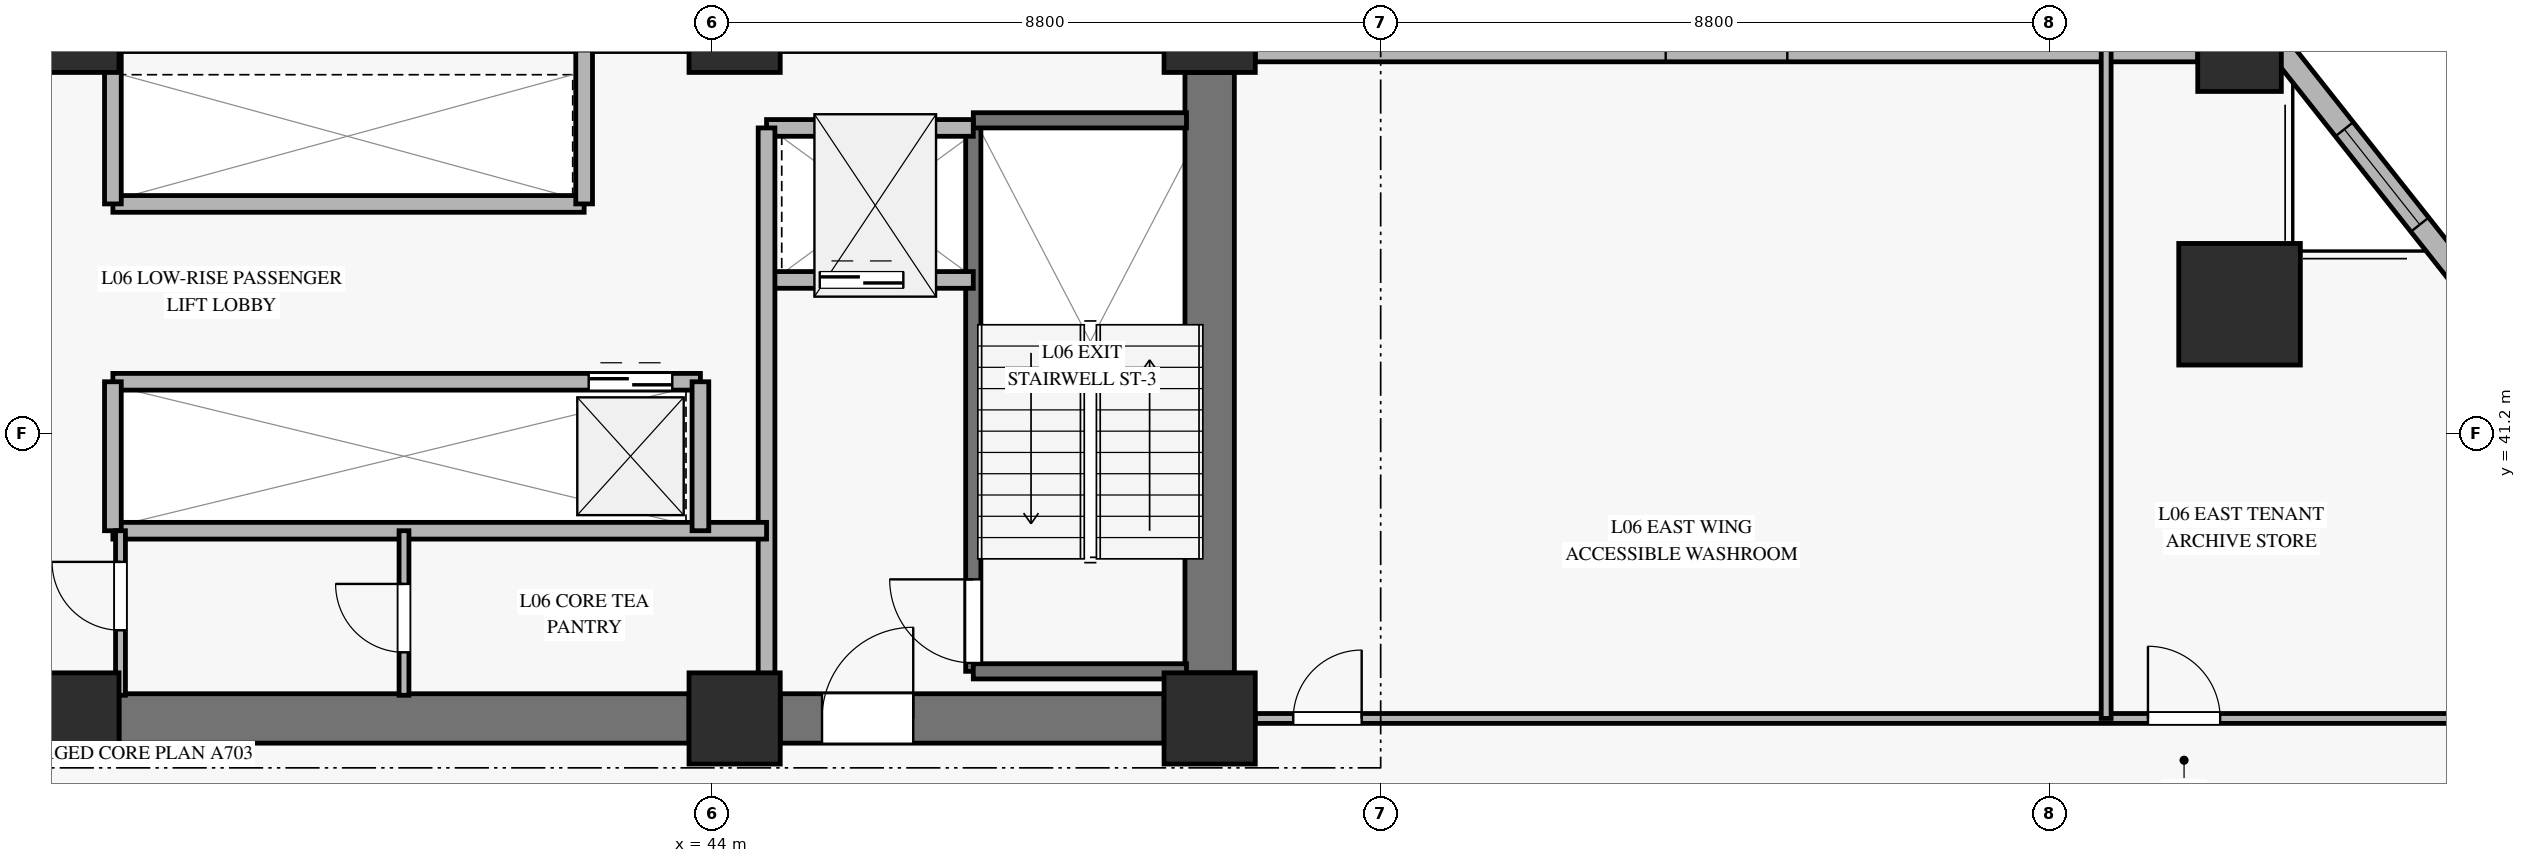
"""IFC4 building model, lengths in metres.
Left out: names, types, materials, properties, quantities, classifications, styles, units other than length and angle.
Written with IfcOpenShell. Run it as: python <this file> out.ifc"""

import sys

from ifc_helpers import new_model, si_unit, direction, frame, frame_2d, origin, origin_2d, place, context, subcontext, project, spatial, rectangle, hollow_rectangle, extrude, source, transform, mapped, element, fill, save


model = new_model("IFC4")
c1 = context("Model", 3, precision=1e-05, world=origin(), true_north=direction((0.0, 1.0)))
c2 = subcontext(c1, "Body", "Model", "MODEL_VIEW")
j1 = project(units=[si_unit("LENGTHUNIT", "METRE"), si_unit("PLANEANGLEUNIT", "RADIAN")], contexts=[c1])
p1 = place(None, origin())
s1 = spatial("IfcSite", under=j1, at=p1, CompositionType="ELEMENT")
p2 = place(p1, origin())
s2 = spatial("IfcBuilding", under=s1, at=p2, CompositionType="ELEMENT")
p3 = place(p2, frame((0.0, 0.0, 25.4)))
s3 = spatial("IfcBuildingStorey", under=s2, at=p3, CompositionType="ELEMENT", Elevation=25.4)
m1 = source(origin(), c2, "Body", "SweptSolid", [
    extrude(rectangle(XDim=1.2, YDim=1.2, at=origin_2d()), origin(), (0.0, 0.0, 1.0), 3.68),
])
for number, where, z_axis, x_axis in (
    (1, (35.6, 37.45, 0.0), (0.0, 0.0, 1.0), (1.0, 0.0, 0.0)),
    (2, (35.6, 46.55, 0.0), (0.0, 0.0, 1.0), (1.0, 0.0, 0.0)),
    (3, (44.3, 37.45, 0.0), (0.0, 0.0, 1.0), (1.0, 0.0, 0.0)),
    (4, (44.3, 46.55, 0.0), (0.0, 0.0, 1.0), (1.0, 0.0, 0.0)),
    (5, (50.55, 37.45, 0.0), (0.0, 0.0, 1.0), (1.0, 0.0, 0.0)),
    (6, (50.55, 46.55, 0.0), (0.0, 0.0, 1.0), (1.0, 0.0, 0.0)),
):
    element("IfcColumn", number, at=place(p3, frame(where, z_axis=z_axis, x_axis=x_axis)), inside=s3, PredefinedType="PILASTER", context=c2, shape_type="MappedRepresentation", body=[
        mapped(m1, transform((0.0, 0.0, 0.0), x_axis=(1.0, 0.0, 0.0), y_axis=(0.0, 1.0, 0.0), z_axis=(0.0, 0.0, 1.0), scale=1.0)),
    ])
p4 = place(p3, frame((36.2, 37.45, 0.0), z_axis=(0.0, 0.0, 1.0), x_axis=(1.0, 0.0, 0.0)))
e7 = element("IfcWall", 7, at=p4, inside=s3, PredefinedType="SHEAR", context=c2, shape_type="SweptSolid", body=[
    extrude(rectangle(XDim=7.5, YDim=0.65, at=frame_2d((3.75, 0.0))), origin(), (0.0, 0.0, 1.0), 3.68),
])
p5 = place(p3, frame((44.9, 37.45, 0.0), z_axis=(0.0, 0.0, 1.0), x_axis=(1.0, 0.0, 0.0)))
e8 = element("IfcWall", 8, at=p5, inside=s3, PredefinedType="SHEAR", context=c2, shape_type="SweptSolid", body=[
    extrude(rectangle(XDim=5.05, YDim=0.65, at=frame_2d((2.525, 0.0))), origin(), (0.0, 0.0, 1.0), 3.68),
])
p6 = place(p5, frame((0.55, 0.0, 0.0)))
e9 = element("IfcOpeningElement", 9, at=p6, cuts=e8, PredefinedType="OPENING", context=c2, shape_type="SweptSolid", body=[
    extrude(rectangle(XDim=1.2, YDim=2.15, at=frame_2d((0.6, 1.075))), frame((0.0, 0.335, 0.0), z_axis=(0.0, -1.0, 0.0), x_axis=(1.0, 0.0, 0.0)), (0.0, 0.0, 1.0), 0.67),
])
p7 = place(p3, frame((50.55, 38.05, 0.0), z_axis=(0.0, 0.0, 1.0), x_axis=(0.0, 1.0, 0.0)))
e10 = element("IfcWall", 10, at=p7, inside=s3, PredefinedType="SHEAR", context=c2, shape_type="SweptSolid", body=[
    extrude(rectangle(XDim=7.9, YDim=0.65, at=frame_2d((3.95, 0.0))), origin(), (0.0, 0.0, 1.0), 3.68),
])
m2 = source(origin(), c2, "Body", "SweptSolid", [
    extrude(hollow_rectangle(XDim=1.6, YDim=1.6, WallThickness=0.075, at=origin_2d()), origin(), (0.0, 0.0, 1.0), 3.68),
])
p8 = place(p3, frame((64.1, 42.9, 0.0), z_axis=(0.0, 0.0, 1.0), x_axis=(1.0, 0.0, 0.0)))
e11 = element("IfcColumn", 11, at=p8, inside=s3, PredefinedType="COLUMN", context=c2, shape_type="MappedRepresentation", body=[
    mapped(m2, transform((0.0, 0.0, 0.0), x_axis=(1.0, 0.0, 0.0), y_axis=(0.0, 1.0, 0.0), z_axis=(0.0, 0.0, 1.0), scale=1.0)),
])
m3 = source(origin(), c2, "Body", "SweptSolid", [
    extrude(hollow_rectangle(XDim=1.1, YDim=1.1, WallThickness=0.05, at=origin_2d()), origin(), (0.0, 0.0, 1.0), 3.68),
])
p9 = place(p3, frame((64.1, 46.25, 0.0), z_axis=(0.0, 0.0, 1.0), x_axis=(1.0, 0.0, 0.0)))
e12 = element("IfcColumn", 12, at=p9, inside=s3, PredefinedType="COLUMN", context=c2, shape_type="MappedRepresentation", body=[
    mapped(m3, transform((0.0, 0.0, 0.0), x_axis=(1.0, 0.0, 0.0), y_axis=(0.0, 1.0, 0.0), z_axis=(0.0, 0.0, 1.0), scale=1.0)),
])
p10 = place(p3, frame((51.15, 46.25, 0.0), z_axis=(0.0, 0.0, 1.0), x_axis=(1.0, 0.0, 0.0)))
e13 = element("IfcWall", 13, at=p10, inside=s3, PredefinedType="SOLIDWALL", context=c2, shape_type="SweptSolid", body=[
    extrude(rectangle(XDim=12.4, YDim=0.32, at=frame_2d((6.2, 0.0))), origin(), (0.0, 0.0, 1.0), 3.16),
])
p11 = place(p10, frame((5.4, 0.0, 0.45)))
e14 = element("IfcOpeningElement", 14, at=p11, cuts=e13, PredefinedType="OPENING", context=c2, shape_type="SweptSolid", body=[
    extrude(rectangle(XDim=1.6, YDim=2.0, at=frame_2d((0.8, 1.0))), frame((0.0, 0.17, 0.0), z_axis=(0.0, -1.0, 0.0), x_axis=(1.0, 0.0, 0.0)), (0.0, 0.0, 1.0), 0.34),
])
p12 = place(p3, frame((67.3, 42.9, 0.0), z_axis=(0.0, 0.0, 1.0), x_axis=(-0.620413042185, 0.784275243194, 0.0)))
e15 = element("IfcWall", 15, at=p12, inside=s3, PredefinedType="SOLIDWALL", context=c2, shape_type="SweptSolid", body=[
    extrude(rectangle(XDim=4.271, YDim=0.3, at=frame_2d((2.136, 0.0))), origin(), (0.0, 0.0, 1.0), 3.16),
])
p13 = place(p12, frame((1.336, 0.0, 0.45)))
e16 = element("IfcOpeningElement", 16, at=p13, cuts=e15, PredefinedType="OPENING", context=c2, shape_type="SweptSolid", body=[
    extrude(rectangle(XDim=1.6, YDim=2.0, at=frame_2d((0.8, 1.0))), frame((0.0, 0.16, 0.0), z_axis=(0.0, -1.0, 0.0), x_axis=(1.0, 0.0, 0.0)), (0.0, 0.0, 1.0), 0.32),
])
p14 = place(p3, frame((47.44, 38.07, 0.0), z_axis=(0.0, 0.0, 1.0), x_axis=(0.0, 1.0, 0.0)))
e17 = element("IfcWall", 17, at=p14, inside=s3, PredefinedType="SOLIDWALL", context=c2, shape_type="SweptSolid", body=[
    extrude(rectangle(XDim=7.25, YDim=0.2, at=frame_2d((3.625, 0.0))), origin(), (0.0, 0.0, 1.0), 3.9),
])
p15 = place(p14, frame((0.11, 0.0, 0.0)))
e18 = element("IfcOpeningElement", 18, at=p15, cuts=e17, PredefinedType="OPENING", context=c2, shape_type="SweptSolid", body=[
    extrude(rectangle(XDim=1.1, YDim=2.15, at=frame_2d((0.55, 1.075))), frame((0.0, 0.11, 0.0), z_axis=(0.0, -1.0, 0.0), x_axis=(1.0, 0.0, 0.0)), (0.0, 0.0, 1.0), 0.22),
])
for number, where, z_axis, x_axis in (
    (19, (47.44, 45.32, 0.0), (0.0, 0.0, 1.0), (1.0, 0.0, 0.0)),
    (20, (47.44, 38.07, 0.0), (0.0, 0.0, 1.0), (1.0, 0.0, 0.0)),
):
    element("IfcWall", number, at=place(p3, frame(where, z_axis=z_axis, x_axis=x_axis)), inside=s3, PredefinedType="SOLIDWALL", context=c2, shape_type="SweptSolid", body=[
        extrude(rectangle(XDim=2.805, YDim=0.2, at=frame_2d((1.403, 0.0))), origin(), (0.0, 0.0, 1.0), 3.9),
    ])
p16 = place(p3, frame((44.72, 43.22, 0.0), z_axis=(0.0, 0.0, 1.0), x_axis=(1.0, 0.0, 0.0)))
e21 = element("IfcWall", 21, at=p16, inside=s3, PredefinedType="SOLIDWALL", context=c2, shape_type="SweptSolid", body=[
    extrude(rectangle(XDim=2.72, YDim=0.22, at=frame_2d((1.36, 0.0))), origin(), (0.0, 0.0, 1.0), 3.68),
])
p17 = place(p16, frame((0.7, 0.0, 0.0)))
e22 = element("IfcOpeningElement", 22, at=p17, cuts=e21, PredefinedType="OPENING", context=c2, shape_type="SweptSolid", body=[
    extrude(rectangle(XDim=1.1, YDim=2.2, at=frame_2d((0.55, 1.1))), frame((0.0, 0.12, 0.0), z_axis=(0.0, -1.0, 0.0), x_axis=(1.0, 0.0, 0.0)), (0.0, 0.0, 1.0), 0.24),
])
p18 = place(p3, frame((44.72, 45.22, 0.0), z_axis=(0.0, 0.0, 1.0), x_axis=(1.0, 0.0, 0.0)))
e23 = element("IfcWall", 23, at=p18, inside=s3, PredefinedType="SOLIDWALL", context=c2, shape_type="SweptSolid", body=[
    extrude(rectangle(XDim=2.72, YDim=0.22, at=frame_2d((1.36, 0.0))), origin(), (0.0, 0.0, 1.0), 3.68),
])
p19 = place(p3, frame((44.72, 37.755, 0.0), z_axis=(0.0, 0.0, 1.0), x_axis=(0.0, 1.0, 0.0)))
e24 = element("IfcWall", 24, at=p19, inside=s3, PredefinedType="SOLIDWALL", context=c2, shape_type="SweptSolid", body=[
    extrude(rectangle(XDim=7.465, YDim=0.22, at=frame_2d((3.732, 0.0))), origin(), (0.0, 0.0, 1.0), 3.68),
])
p20 = place(p3, frame((36.12, 44.22, 0.0), z_axis=(0.0, 0.0, 1.0), x_axis=(1.0, 0.0, 0.0)))
e25 = element("IfcWall", 25, at=p20, inside=s3, PredefinedType="SOLIDWALL", context=c2, shape_type="SweptSolid", body=[
    extrude(rectangle(XDim=6.2, YDim=0.22, at=frame_2d((3.1, 0.0))), origin(), (0.0, 0.0, 1.0), 3.68),
])
for number, where, z_axis, x_axis in (
    (26, (36.12, 44.22, 0.0), (0.0, 0.0, 1.0), (0.0, 1.0, 0.0)),
    (27, (42.32, 44.22, 0.0), (0.0, 0.0, 1.0), (0.0, 1.0, 0.0)),
):
    element("IfcWall", number, at=place(p3, frame(where, z_axis=z_axis, x_axis=x_axis)), inside=s3, PredefinedType="SOLIDWALL", context=c2, shape_type="SweptSolid", body=[
        extrude(rectangle(XDim=2.025, YDim=0.22, at=frame_2d((1.013, 0.0))), origin(), (0.0, 0.0, 1.0), 3.68),
    ])
p21 = place(p3, frame((36.12, 41.88, 0.0), z_axis=(0.0, 0.0, 1.0), x_axis=(1.0, 0.0, 0.0)))
e28 = element("IfcWall", 28, at=p21, inside=s3, PredefinedType="SOLIDWALL", context=c2, shape_type="SweptSolid", body=[
    extrude(rectangle(XDim=7.73, YDim=0.22, at=frame_2d((3.865, 0.0))), origin(), (0.0, 0.0, 1.0), 3.68),
])
p22 = place(p21, frame((6.26, 0.0, 0.0)))
e29 = element("IfcOpeningElement", 29, at=p22, cuts=e28, PredefinedType="OPENING", context=c2, shape_type="SweptSolid", body=[
    extrude(rectangle(XDim=1.1, YDim=2.2, at=frame_2d((0.55, 1.1))), frame((0.0, 0.12, 0.0), z_axis=(0.0, -1.0, 0.0), x_axis=(1.0, 0.0, 0.0)), (0.0, 0.0, 1.0), 0.24),
])
p23 = place(p3, frame((36.12, 39.92, 0.0), z_axis=(0.0, 0.0, 1.0), x_axis=(1.0, 0.0, 0.0)))
e30 = element("IfcWall", 30, at=p23, inside=s3, PredefinedType="SOLIDWALL", context=c2, shape_type="SweptSolid", body=[
    extrude(rectangle(XDim=8.6, YDim=0.22, at=frame_2d((4.3, 0.0))), origin(), (0.0, 0.0, 1.0), 2.965),
])
for number, where, z_axis, x_axis in (
    (31, (36.12, 39.92, 0.0), (0.0, 0.0, 1.0), (0.0, 1.0, 0.0)),
    (32, (43.85, 39.92, 0.0), (0.0, 0.0, 1.0), (0.0, 1.0, 0.0)),
):
    element("IfcWall", number, at=place(p3, frame(where, z_axis=z_axis, x_axis=x_axis)), inside=s3, PredefinedType="SOLIDWALL", context=c2, shape_type="SweptSolid", body=[
        extrude(rectangle(XDim=1.96, YDim=0.22, at=frame_2d((0.98, 0.0))), origin(), (0.0, 0.0, 1.0), 3.68),
    ])
p24 = place(p3, frame((36.22, 37.755, 0.0), z_axis=(0.0, 0.0, 1.0), x_axis=(0.0, 1.0, 0.0)))
e33 = element("IfcWall", 33, at=p24, inside=s3, PredefinedType="PARTITIONING", context=c2, shape_type="SweptSolid", body=[
    extrude(rectangle(XDim=2.165, YDim=0.13, at=frame_2d((1.083, 0.0))), origin(), (0.0, 0.0, 1.0), 3.68),
])
p25 = place(p24, frame((0.855, 0.0, 0.0)))
e34 = element("IfcOpeningElement", 34, at=p25, cuts=e33, PredefinedType="OPENING", context=c2, shape_type="SweptSolid", body=[
    extrude(rectangle(XDim=0.9, YDim=2.1, at=frame_2d((0.45, 1.05))), frame((0.0, 0.075, 0.0), z_axis=(0.0, -1.0, 0.0), x_axis=(1.0, 0.0, 0.0)), (0.0, 0.0, 1.0), 0.15),
])
p26 = place(p3, frame((39.95, 37.755, 0.0), z_axis=(0.0, 0.0, 1.0), x_axis=(0.0, 1.0, 0.0)))
e35 = element("IfcWall", 35, at=p26, inside=s3, PredefinedType="PARTITIONING", context=c2, shape_type="SweptSolid", body=[
    extrude(rectangle(XDim=2.165, YDim=0.13, at=frame_2d((1.083, 0.0))), origin(), (0.0, 0.0, 1.0), 3.68),
])
p27 = place(p26, frame((0.565, 0.0, 0.0)))
e36 = element("IfcOpeningElement", 36, at=p27, cuts=e35, PredefinedType="OPENING", context=c2, shape_type="SweptSolid", body=[
    extrude(rectangle(XDim=0.9, YDim=2.1, at=frame_2d((0.45, 1.05))), frame((0.0, 0.075, 0.0), z_axis=(0.0, -1.0, 0.0), x_axis=(1.0, 0.0, 0.0)), (0.0, 0.0, 1.0), 0.15),
])
p28 = place(p3, frame((51.15, 37.45, 0.0), z_axis=(0.0, 0.0, 1.0), x_axis=(1.0, 0.0, 0.0)))
e37 = element("IfcWall", 37, at=p28, inside=s3, PredefinedType="PARTITIONING", context=c2, shape_type="SweptSolid", body=[
    extrude(rectangle(XDim=16.15, YDim=0.13, at=frame_2d((8.075, 0.0))), origin(), (0.0, 0.0, 1.0), 3.165),
])
p29 = place(p28, frame((0.5, 0.0, 0.0)))
e38 = element("IfcOpeningElement", 38, at=p29, cuts=e37, PredefinedType="OPENING", context=c2, shape_type="SweptSolid", body=[
    extrude(rectangle(XDim=0.9, YDim=2.1, at=frame_2d((0.45, 1.05))), frame((0.0, 0.075, 0.0), z_axis=(0.0, -1.0, 0.0), x_axis=(1.0, 0.0, 0.0)), (0.0, 0.0, 1.0), 0.15),
])
p30 = place(p28, frame((11.745, 0.0, 0.0)))
e39 = element("IfcOpeningElement", 39, at=p30, cuts=e37, PredefinedType="OPENING", context=c2, shape_type="SweptSolid", body=[
    extrude(rectangle(XDim=0.95, YDim=2.1, at=frame_2d((0.475, 1.05))), frame((0.0, 0.075, 0.0), z_axis=(0.0, -1.0, 0.0), x_axis=(1.0, 0.0, 0.0)), (0.0, 0.0, 1.0), 0.15),
])
p31 = place(p3, frame((62.345, 37.45, 0.0), z_axis=(0.0, 0.0, 1.0), x_axis=(0.0, 1.0, 0.0)))
e40 = element("IfcWall", 40, at=p31, inside=s3, PredefinedType="PARTITIONING", context=c2, shape_type="SweptSolid", body=[
    extrude(rectangle(XDim=8.8, YDim=0.13, at=frame_2d((4.4, 0.0))), origin(), (0.0, 0.0, 1.0), 3.68),
])
m4 = source(origin(), c2, "Body", "SweptSolid", [
    extrude(rectangle(XDim=1.6, YDim=2.0, at=frame_2d((0.8, 1.0))), frame((0.0, 0.03, 0.0), z_axis=(0.0, -1.0, 0.0), x_axis=(1.0, 0.0, 0.0)), (0.0, 0.0, 1.0), 0.06),
])
p32 = place(p13, origin())
e41 = element("IfcWindow", 41, at=p32, inside=s3, PartitioningType="SINGLE_PANEL", PredefinedType="WINDOW", context=c2, shape_type="MappedRepresentation", body=[
    mapped(m4, transform((0.0, 0.0, 0.0), x_axis=(1.0, 0.0, 0.0), y_axis=(0.0, 1.0, 0.0), z_axis=(0.0, 0.0, 1.0), scale=1.0)),
])
fill(e16, e41)
m5 = source(origin(), c2, "Body", "SweptSolid", [
    extrude(rectangle(XDim=1.1, YDim=2.15, at=frame_2d((0.55, 1.075))), frame((0.0, 0.025, 0.0), z_axis=(0.0, -1.0, 0.0), x_axis=(1.0, 0.0, 0.0)), (0.0, 0.0, 1.0), 0.05),
])
p33 = place(p15, origin())
e42 = element("IfcDoor", 42, at=p33, inside=s3, OperationType="SINGLE_SWING_RIGHT", PredefinedType="DOOR", context=c2, shape_type="MappedRepresentation", body=[
    mapped(m5, transform((0.0, 0.0, 0.0), x_axis=(1.0, 0.0, 0.0), y_axis=(0.0, 1.0, 0.0), z_axis=(0.0, 0.0, 1.0), scale=1.0)),
])
fill(e18, e42)
m6 = source(origin(), c2, "Body", "SweptSolid", [
    extrude(rectangle(XDim=1.1, YDim=2.2, at=frame_2d((0.55, 1.1))), frame((0.0, 0.025, 0.0), z_axis=(0.0, -1.0, 0.0), x_axis=(1.0, 0.0, 0.0)), (0.0, 0.0, 1.0), 0.05),
])
p34 = place(p17, origin())
e43 = element("IfcDoor", 43, at=p34, inside=s3, OperationType="SLIDING_TO_LEFT", PredefinedType="DOOR", context=c2, shape_type="MappedRepresentation", body=[
    mapped(m6, transform((0.0, 0.0, 0.0), x_axis=(1.0, 0.0, 0.0), y_axis=(0.0, 1.0, 0.0), z_axis=(0.0, 0.0, 1.0), scale=1.0)),
])
fill(e22, e43)
m7 = source(origin(), c2, "Body", "SweptSolid", [
    extrude(rectangle(XDim=1.2, YDim=2.15, at=frame_2d((0.6, 1.075))), frame((0.0, 0.025, 0.0), z_axis=(0.0, -1.0, 0.0), x_axis=(1.0, 0.0, 0.0)), (0.0, 0.0, 1.0), 0.05),
])
p35 = place(p6, origin())
e44 = element("IfcDoor", 44, at=p35, inside=s3, OperationType="SINGLE_SWING_RIGHT", PredefinedType="DOOR", context=c2, shape_type="MappedRepresentation", body=[
    mapped(m7, transform((0.0, 0.0, 0.0), x_axis=(1.0, 0.0, 0.0), y_axis=(0.0, 1.0, 0.0), z_axis=(0.0, 0.0, 1.0), scale=1.0)),
])
fill(e9, e44)
p36 = place(p22, origin())
e45 = element("IfcDoor", 45, at=p36, inside=s3, OperationType="SLIDING_TO_LEFT", PredefinedType="DOOR", context=c2, shape_type="MappedRepresentation", body=[
    mapped(m6, transform((0.0, 0.0, 0.0), x_axis=(1.0, 0.0, 0.0), y_axis=(0.0, 1.0, 0.0), z_axis=(0.0, 0.0, 1.0), scale=1.0)),
])
fill(e29, e45)
m8 = source(origin(), c2, "Body", "SweptSolid", [
    extrude(rectangle(XDim=0.9, YDim=2.1, at=frame_2d((0.45, 1.05))), frame((0.0, 0.025, 0.0), z_axis=(0.0, -1.0, 0.0), x_axis=(1.0, 0.0, 0.0)), (0.0, 0.0, 1.0), 0.05),
])
p37 = place(p25, origin())
e46 = element("IfcDoor", 46, at=p37, inside=s3, OperationType="SINGLE_SWING_RIGHT", PredefinedType="DOOR", context=c2, shape_type="MappedRepresentation", body=[
    mapped(m8, transform((0.0, 0.0, 0.0), x_axis=(1.0, 0.0, 0.0), y_axis=(0.0, 1.0, 0.0), z_axis=(0.0, 0.0, 1.0), scale=1.0)),
])
fill(e34, e46)
p38 = place(p27, origin())
e47 = element("IfcDoor", 47, at=p38, inside=s3, OperationType="SINGLE_SWING_RIGHT", PredefinedType="DOOR", context=c2, shape_type="MappedRepresentation", body=[
    mapped(m8, transform((0.0, 0.0, 0.0), x_axis=(1.0, 0.0, 0.0), y_axis=(0.0, 1.0, 0.0), z_axis=(0.0, 0.0, 1.0), scale=1.0)),
])
fill(e36, e47)
p39 = place(p29, origin())
e48 = element("IfcDoor", 48, at=p39, inside=s3, OperationType="SINGLE_SWING_RIGHT", PredefinedType="DOOR", context=c2, shape_type="MappedRepresentation", body=[
    mapped(m8, transform((0.0, 0.0, 0.0), x_axis=(1.0, 0.0, 0.0), y_axis=(0.0, 1.0, 0.0), z_axis=(0.0, 0.0, 1.0), scale=1.0)),
])
fill(e38, e48)
m9 = source(origin(), c2, "Body", "SweptSolid", [
    extrude(rectangle(XDim=0.95, YDim=2.1, at=frame_2d((0.475, 1.05))), frame((0.0, 0.025, 0.0), z_axis=(0.0, -1.0, 0.0), x_axis=(1.0, 0.0, 0.0)), (0.0, 0.0, 1.0), 0.05),
])
p40 = place(p30, origin())
e49 = element("IfcDoor", 49, at=p40, inside=s3, OperationType="SINGLE_SWING_LEFT", PredefinedType="DOOR", context=c2, shape_type="MappedRepresentation", body=[
    mapped(m9, transform((0.0, 0.0, 0.0), x_axis=(1.0, 0.0, 0.0), y_axis=(0.0, 1.0, 0.0), z_axis=(0.0, 0.0, 1.0), scale=1.0)),
])
fill(e39, e49)
save(model, sys.argv[1])
